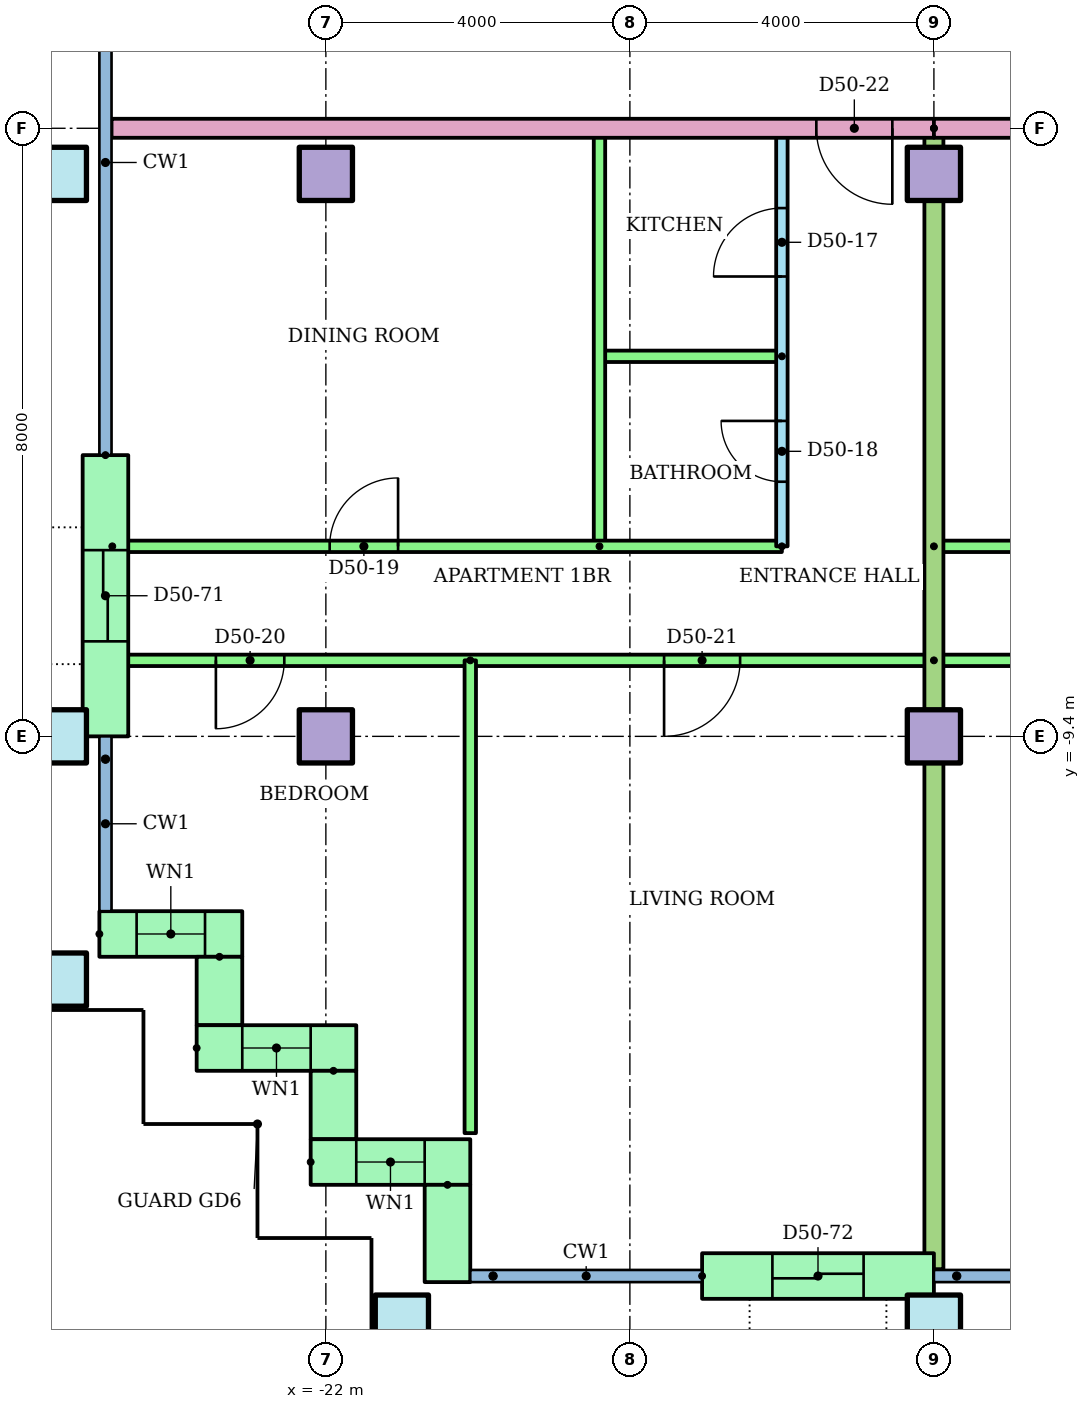
"""IFC4 building model, lengths in metres.
Left out: names, types, materials, properties, quantities, classifications, styles, units other than length and angle.
Written with IfcOpenShell. Run it as: python <this file> out.ifc"""

import sys

from ifc_helpers import new_model, si_unit, direction, frame, frame_2d, origin, origin_2d, place, context, subcontext, project, spatial, rectangle, hollow_rectangle, extrude, element, fill, save


model = new_model("IFC4")
c1 = context("Model", 3, precision=1e-05, world=origin(), true_north=direction((0.0, 1.0)))
c2 = subcontext(c1, "Body", "Model", "MODEL_VIEW")
j1 = project(units=[si_unit("LENGTHUNIT", "METRE"), si_unit("PLANEANGLEUNIT", "RADIAN")], contexts=[c1])
p1 = place(None, origin())
s1 = spatial("IfcSite", under=j1, at=p1, CompositionType="ELEMENT")
p2 = place(p1, origin())
s2 = spatial("IfcBuilding", under=s1, at=p2, CompositionType="ELEMENT")
p3 = place(p2, frame((0.0, 0.0, 190.9)))
s3 = spatial("IfcBuildingStorey", under=s2, at=p3, CompositionType="ELEMENT", Elevation=190.9)
for number, where in (
    (1, (-21.0, -17.1, 0.0)),
    (2, (-14.0, -17.1, 0.0)),
    (3, (-25.5, -12.6, 0.0)),
    (4, (-25.5, -9.4, 0.0)),
):
    element("IfcColumn", number, at=place(p3, frame(where)), inside=s3, PredefinedType="COLUMN", context=c2, shape_type="SweptSolid", body=[
        extrude(hollow_rectangle(XDim=0.7, YDim=0.7, WallThickness=0.036, at=origin_2d()), origin(), (0.0, 0.0, 1.0), 3.2),
    ])
for number, where in (
    (5, (-22.0, -9.4, 0.0)),
    (6, (-14.0, -9.4, 0.0)),
):
    element("IfcColumn", number, at=place(p3, frame(where)), inside=s3, PredefinedType="COLUMN", context=c2, shape_type="SweptSolid", body=[
        extrude(rectangle(XDim=0.7, YDim=0.7, at=origin_2d()), origin(), (0.0, 0.0, 1.0), 3.2),
    ])
p4 = place(p3, frame((-25.5, -2.0, 0.0)))
e7 = element("IfcColumn", 7, at=p4, inside=s3, PredefinedType="COLUMN", context=c2, shape_type="SweptSolid", body=[
    extrude(hollow_rectangle(XDim=0.7, YDim=0.7, WallThickness=0.036, at=origin_2d()), origin(), (0.0, 0.0, 1.0), 3.2),
])
for number, where in (
    (8, (-22.0, -2.0, 0.0)),
    (9, (-14.0, -2.0, 0.0)),
):
    element("IfcColumn", number, at=place(p3, frame(where)), inside=s3, PredefinedType="COLUMN", context=c2, shape_type="SweptSolid", body=[
        extrude(rectangle(XDim=0.7, YDim=0.7, at=origin_2d()), origin(), (0.0, 0.0, 1.0), 3.2),
    ])
p5 = place(p3, frame((-24.9, -5.7, 0.0), z_axis=(0.0, 0.0, 1.0), x_axis=(0.0, -1.0, 0.0)))
e10 = element("IfcWall", 10, at=p5, inside=s3, PredefinedType="STANDARD", context=c2, shape_type="SweptSolid", body=[
    extrude(rectangle(XDim=3.7, YDim=0.6, at=frame_2d((1.85, 0.0))), origin(), (0.0, 0.0, 1.0), 2.8),
])
p6 = place(p5, frame((1.25, 0.0, 0.0)))
e11 = element("IfcOpeningElement", 11, at=p6, cuts=e10, PredefinedType="OPENING", context=c2, shape_type="SweptSolid", body=[
    extrude(rectangle(XDim=1.2, YDim=2.1, at=frame_2d((0.6, 1.05))), frame((0.0, 0.31, 0.0), z_axis=(0.0, -1.0, 0.0), x_axis=(1.0, 0.0, 0.0)), (0.0, 0.0, 1.0), 0.62),
])
p7 = place(p3, frame((-24.98, -12.0, 0.0)))
e12 = element("IfcWall", 12, at=p7, inside=s3, PredefinedType="STANDARD", context=c2, shape_type="SweptSolid", body=[
    extrude(rectangle(XDim=1.88, YDim=0.6, at=frame_2d((0.94, 0.0))), origin(), (0.0, 0.0, 1.0), 2.8),
])
p8 = place(p7, frame((0.49, 0.0, 0.9)))
e13 = element("IfcOpeningElement", 13, at=p8, cuts=e12, PredefinedType="OPENING", context=c2, shape_type="SweptSolid", body=[
    extrude(rectangle(XDim=0.9, YDim=1.5, at=frame_2d((0.45, 0.75))), frame((0.0, 0.31, 0.0), z_axis=(0.0, -1.0, 0.0), x_axis=(1.0, 0.0, 0.0)), (0.0, 0.0, 1.0), 0.62),
])
p9 = place(p3, frame((-23.4, -12.3, 0.0), z_axis=(0.0, 0.0, 1.0), x_axis=(0.0, -1.0, 0.0)))
e14 = element("IfcWall", 14, at=p9, inside=s3, PredefinedType="STANDARD", context=c2, shape_type="SweptSolid", body=[
    extrude(rectangle(XDim=0.9, YDim=0.6, at=frame_2d((0.45, 0.0))), origin(), (0.0, 0.0, 1.0), 2.8),
])
p10 = place(p3, frame((-23.7, -13.5, 0.0)))
e15 = element("IfcWall", 15, at=p10, inside=s3, PredefinedType="STANDARD", context=c2, shape_type="SweptSolid", body=[
    extrude(rectangle(XDim=2.1, YDim=0.6, at=frame_2d((1.05, 0.0))), origin(), (0.0, 0.0, 1.0), 2.8),
])
p11 = place(p10, frame((0.6, 0.0, 0.9)))
e16 = element("IfcOpeningElement", 16, at=p11, cuts=e15, PredefinedType="OPENING", context=c2, shape_type="SweptSolid", body=[
    extrude(rectangle(XDim=0.9, YDim=1.5, at=frame_2d((0.45, 0.75))), frame((0.0, 0.31, 0.0), z_axis=(0.0, -1.0, 0.0), x_axis=(1.0, 0.0, 0.0)), (0.0, 0.0, 1.0), 0.62),
])
p12 = place(p3, frame((-21.9, -13.8, 0.0), z_axis=(0.0, 0.0, 1.0), x_axis=(0.0, -1.0, 0.0)))
e17 = element("IfcWall", 17, at=p12, inside=s3, PredefinedType="STANDARD", context=c2, shape_type="SweptSolid", body=[
    extrude(rectangle(XDim=0.9, YDim=0.6, at=frame_2d((0.45, 0.0))), origin(), (0.0, 0.0, 1.0), 2.8),
])
p13 = place(p3, frame((-22.2, -15.0, 0.0)))
e18 = element("IfcWall", 18, at=p13, inside=s3, PredefinedType="STANDARD", context=c2, shape_type="SweptSolid", body=[
    extrude(rectangle(XDim=2.1, YDim=0.6, at=frame_2d((1.05, 0.0))), origin(), (0.0, 0.0, 1.0), 2.8),
])
p14 = place(p13, frame((0.6, 0.0, 0.9)))
e19 = element("IfcOpeningElement", 19, at=p14, cuts=e18, PredefinedType="OPENING", context=c2, shape_type="SweptSolid", body=[
    extrude(rectangle(XDim=0.9, YDim=1.5, at=frame_2d((0.45, 0.75))), frame((0.0, 0.31, 0.0), z_axis=(0.0, -1.0, 0.0), x_axis=(1.0, 0.0, 0.0)), (0.0, 0.0, 1.0), 0.62),
])
p15 = place(p3, frame((-20.4, -15.3, 0.0), z_axis=(0.0, 0.0, 1.0), x_axis=(0.0, -1.0, 0.0)))
e20 = element("IfcWall", 20, at=p15, inside=s3, PredefinedType="STANDARD", context=c2, shape_type="SweptSolid", body=[
    extrude(rectangle(XDim=1.28, YDim=0.6, at=frame_2d((0.64, 0.0))), origin(), (0.0, 0.0, 1.0), 2.8),
])
p16 = place(p3, frame((-17.05, -16.5, 0.0)))
e21 = element("IfcWall", 21, at=p16, inside=s3, PredefinedType="STANDARD", context=c2, shape_type="SweptSolid", body=[
    extrude(rectangle(XDim=3.05, YDim=0.6, at=frame_2d((1.525, 0.0))), origin(), (0.0, 0.0, 1.0), 2.8),
])
p17 = place(p16, frame((0.925, 0.0, 0.0)))
e22 = element("IfcOpeningElement", 22, at=p17, cuts=e21, PredefinedType="OPENING", context=c2, shape_type="SweptSolid", body=[
    extrude(rectangle(XDim=1.2, YDim=2.1, at=frame_2d((0.6, 1.05))), frame((0.0, 0.31, 0.0), z_axis=(0.0, -1.0, 0.0), x_axis=(1.0, 0.0, 0.0)), (0.0, 0.0, 1.0), 0.62),
])
p18 = place(p3, frame((-16.0, -6.9, 0.0), z_axis=(0.0, 0.0, 1.0), x_axis=(0.0, 1.0, 0.0)))
e23 = element("IfcWall", 23, at=p18, inside=s3, PredefinedType="PARTITIONING", context=c2, shape_type="SweptSolid", body=[
    extrude(rectangle(XDim=5.5, YDim=0.15, at=frame_2d((2.75, 0.0))), origin(), (0.0, 0.0, 1.0), 2.4),
])
p19 = place(p18, frame((3.55, 0.0, 0.0)))
e24 = element("IfcOpeningElement", 24, at=p19, cuts=e23, PredefinedType="OPENING", context=c2, shape_type="SweptSolid", body=[
    extrude(rectangle(XDim=0.9, YDim=2.1, at=frame_2d((0.45, 1.05))), frame((0.0, 0.085, 0.0), z_axis=(0.0, -1.0, 0.0), x_axis=(1.0, 0.0, 0.0)), (0.0, 0.0, 1.0), 0.17),
])
p20 = place(p18, frame((0.85, 0.0, 0.0)))
e25 = element("IfcOpeningElement", 25, at=p20, cuts=e23, PredefinedType="OPENING", context=c2, shape_type="SweptSolid", body=[
    extrude(rectangle(XDim=0.8, YDim=2.1, at=frame_2d((0.4, 1.05))), frame((0.0, 0.085, 0.0), z_axis=(0.0, -1.0, 0.0), x_axis=(1.0, 0.0, 0.0)), (0.0, 0.0, 1.0), 0.17),
])
p21 = place(p3, frame((-16.0, -4.4, 0.0), z_axis=(0.0, 0.0, 1.0), x_axis=(-1.0, 0.0, 0.0)))
e26 = element("IfcWall", 26, at=p21, inside=s3, PredefinedType="PARTITIONING", context=c2, shape_type="SweptSolid", body=[
    extrude(rectangle(XDim=2.4, YDim=0.15, at=frame_2d((1.2, 0.0))), origin(), (0.0, 0.0, 1.0), 2.4),
])
p22 = place(p3, frame((-18.4, -6.9, 0.0), z_axis=(0.0, 0.0, 1.0), x_axis=(0.0, 1.0, 0.0)))
e27 = element("IfcWall", 27, at=p22, inside=s3, PredefinedType="PARTITIONING", context=c2, shape_type="SweptSolid", body=[
    extrude(rectangle(XDim=5.5, YDim=0.15, at=frame_2d((2.75, 0.0))), origin(), (0.0, 0.0, 1.0), 2.4),
])
p23 = place(p3, frame((-24.81, -6.9, 0.0)))
e28 = element("IfcWall", 28, at=p23, inside=s3, PredefinedType="PARTITIONING", context=c2, shape_type="SweptSolid", body=[
    extrude(rectangle(XDim=8.81, YDim=0.15, at=frame_2d((4.405, 0.0))), origin(), (0.0, 0.0, 1.0), 2.4),
])
p24 = place(p23, frame((2.86, 0.0, 0.0)))
e29 = element("IfcOpeningElement", 29, at=p24, cuts=e28, PredefinedType="OPENING", context=c2, shape_type="SweptSolid", body=[
    extrude(rectangle(XDim=0.9, YDim=2.1, at=frame_2d((0.45, 1.05))), frame((0.0, 0.085, 0.0), z_axis=(0.0, -1.0, 0.0), x_axis=(1.0, 0.0, 0.0)), (0.0, 0.0, 1.0), 0.17),
])
p25 = place(p3, frame((-14.0, -8.4, 0.0), z_axis=(0.0, 0.0, 1.0), x_axis=(-1.0, 0.0, 0.0)))
e30 = element("IfcWall", 30, at=p25, inside=s3, PredefinedType="PARTITIONING", context=c2, shape_type="SweptSolid", body=[
    extrude(rectangle(XDim=10.81, YDim=0.15, at=frame_2d((5.405, 0.0))), origin(), (0.0, 0.0, 1.0), 2.4),
])
p26 = place(p25, frame((8.547, 0.0, 0.0)))
e31 = element("IfcOpeningElement", 31, at=p26, cuts=e30, PredefinedType="OPENING", context=c2, shape_type="SweptSolid", body=[
    extrude(rectangle(XDim=0.9, YDim=2.1, at=frame_2d((0.45, 1.05))), frame((0.0, 0.085, 0.0), z_axis=(0.0, -1.0, 0.0), x_axis=(1.0, 0.0, 0.0)), (0.0, 0.0, 1.0), 0.17),
])
p27 = place(p25, frame((2.55, 0.0, 0.0)))
e32 = element("IfcOpeningElement", 32, at=p27, cuts=e30, PredefinedType="OPENING", context=c2, shape_type="SweptSolid", body=[
    extrude(rectangle(XDim=1.0, YDim=2.1, at=frame_2d((0.5, 1.05))), frame((0.0, 0.085, 0.0), z_axis=(0.0, -1.0, 0.0), x_axis=(1.0, 0.0, 0.0)), (0.0, 0.0, 1.0), 0.17),
])
p28 = place(p3, frame((-20.1, -8.4, 0.0), z_axis=(0.0, 0.0, 1.0), x_axis=(0.0, -1.0, 0.0)))
e33 = element("IfcWall", 33, at=p28, inside=s3, PredefinedType="PARTITIONING", context=c2, shape_type="SweptSolid", body=[
    extrude(rectangle(XDim=6.22, YDim=0.15, at=frame_2d((3.11, 0.0))), origin(), (0.0, 0.0, 1.0), 2.4),
])
p29 = place(p3, frame((-14.0, -6.9, 0.0)))
e34 = element("IfcWall", 34, at=p29, inside=s3, PredefinedType="PARTITIONING", context=c2, shape_type="SweptSolid", body=[
    extrude(rectangle(XDim=22.0, YDim=0.15, at=frame_2d((11.0, 0.0))), origin(), (0.0, 0.0, 1.0), 2.4),
])
p30 = place(p29, frame((15.025, 0.0, 0.0)))
e35 = element("IfcOpeningElement", 35, at=p30, cuts=e34, PredefinedType="OPENING", context=c2, shape_type="SweptSolid", body=[
    extrude(rectangle(XDim=0.9, YDim=2.1, at=frame_2d((0.45, 1.05))), frame((0.0, 0.085, 0.0), z_axis=(0.0, -1.0, 0.0), x_axis=(1.0, 0.0, 0.0)), (0.0, 0.0, 1.0), 0.17),
])
p31 = place(p29, frame((7.65, 0.0, 0.0)))
e36 = element("IfcOpeningElement", 36, at=p31, cuts=e34, PredefinedType="OPENING", context=c2, shape_type="SweptSolid", body=[
    extrude(rectangle(XDim=0.9, YDim=2.1, at=frame_2d((0.45, 1.05))), frame((0.0, 0.085, 0.0), z_axis=(0.0, -1.0, 0.0), x_axis=(1.0, 0.0, 0.0)), (0.0, 0.0, 1.0), 0.17),
])
p32 = place(p29, frame((1.975, 0.0, 0.0)))
e37 = element("IfcOpeningElement", 37, at=p32, cuts=e34, PredefinedType="OPENING", context=c2, shape_type="SweptSolid", body=[
    extrude(rectangle(XDim=0.9, YDim=2.1, at=frame_2d((0.45, 1.05))), frame((0.0, 0.085, 0.0), z_axis=(0.0, -1.0, 0.0), x_axis=(1.0, 0.0, 0.0)), (0.0, 0.0, 1.0), 0.17),
])
p33 = place(p3, frame((10.0, -8.4, 0.0), z_axis=(0.0, 0.0, 1.0), x_axis=(-1.0, 0.0, 0.0)))
e38 = element("IfcWall", 38, at=p33, inside=s3, PredefinedType="PARTITIONING", context=c2, shape_type="SweptSolid", body=[
    extrude(rectangle(XDim=24.0, YDim=0.15, at=frame_2d((12.0, 0.0))), origin(), (0.0, 0.0, 1.0), 2.4),
])
p34 = place(p33, frame((19.5, 0.0, 0.0)))
e39 = element("IfcOpeningElement", 39, at=p34, cuts=e38, PredefinedType="OPENING", context=c2, shape_type="SweptSolid", body=[
    extrude(rectangle(XDim=1.0, YDim=2.1, at=frame_2d((0.5, 1.05))), frame((0.0, 0.085, 0.0), z_axis=(0.0, -1.0, 0.0), x_axis=(1.0, 0.0, 0.0)), (0.0, 0.0, 1.0), 0.17),
])
p35 = place(p33, frame((13.55, 0.0, 0.0)))
e40 = element("IfcOpeningElement", 40, at=p35, cuts=e38, PredefinedType="OPENING", context=c2, shape_type="SweptSolid", body=[
    extrude(rectangle(XDim=0.9, YDim=2.1, at=frame_2d((0.45, 1.05))), frame((0.0, 0.085, 0.0), z_axis=(0.0, -1.0, 0.0), x_axis=(1.0, 0.0, 0.0)), (0.0, 0.0, 1.0), 0.17),
])
p36 = place(p33, frame((9.55, 0.0, 0.0)))
e41 = element("IfcOpeningElement", 41, at=p36, cuts=e38, PredefinedType="OPENING", context=c2, shape_type="SweptSolid", body=[
    extrude(rectangle(XDim=0.9, YDim=2.1, at=frame_2d((0.45, 1.05))), frame((0.0, 0.085, 0.0), z_axis=(0.0, -1.0, 0.0), x_axis=(1.0, 0.0, 0.0)), (0.0, 0.0, 1.0), 0.17),
])
p37 = place(p33, frame((5.55, 0.0, 0.0)))
e42 = element("IfcOpeningElement", 42, at=p37, cuts=e38, PredefinedType="OPENING", context=c2, shape_type="SweptSolid", body=[
    extrude(rectangle(XDim=0.9, YDim=2.1, at=frame_2d((0.45, 1.05))), frame((0.0, 0.085, 0.0), z_axis=(0.0, -1.0, 0.0), x_axis=(1.0, 0.0, 0.0)), (0.0, 0.0, 1.0), 0.17),
])
p38 = place(p33, frame((1.55, 0.0, 0.0)))
e43 = element("IfcOpeningElement", 43, at=p38, cuts=e38, PredefinedType="OPENING", context=c2, shape_type="SweptSolid", body=[
    extrude(rectangle(XDim=0.9, YDim=2.1, at=frame_2d((0.45, 1.05))), frame((0.0, 0.085, 0.0), z_axis=(0.0, -1.0, 0.0), x_axis=(1.0, 0.0, 0.0)), (0.0, 0.0, 1.0), 0.17),
])
p39 = place(p3, frame((-14.0, -1.4, 0.0), z_axis=(0.0, 0.0, 1.0), x_axis=(0.0, -1.0, 0.0)))
e44 = element("IfcWall", 44, at=p39, inside=s3, PredefinedType="PARTITIONING", context=c2, shape_type="SweptSolid", body=[
    extrude(rectangle(XDim=15.01, YDim=0.25, at=frame_2d((7.505, 0.0))), origin(), (0.0, 0.0, 1.0), 2.4),
])
p40 = place(p3, frame((-14.0, -1.4, 0.0), z_axis=(0.0, 0.0, 1.0), x_axis=(-1.0, 0.0, 0.0)))
e45 = element("IfcWall", 45, at=p40, inside=s3, PredefinedType="PARTITIONING", context=c2, shape_type="SweptSolid", body=[
    extrude(rectangle(XDim=10.82, YDim=0.25, at=frame_2d((5.41, 0.0))), origin(), (0.0, 0.0, 1.0), 2.4),
])
p41 = place(p40, frame((0.547, 0.0, 0.0)))
e46 = element("IfcOpeningElement", 46, at=p41, cuts=e45, PredefinedType="OPENING", context=c2, shape_type="SweptSolid", body=[
    extrude(rectangle(XDim=1.0, YDim=2.1, at=frame_2d((0.5, 1.05))), frame((0.0, 0.135, 0.0), z_axis=(0.0, -1.0, 0.0), x_axis=(1.0, 0.0, 0.0)), (0.0, 0.0, 1.0), 0.27),
])
p42 = place(p3, frame((14.0, -1.4, 0.0), z_axis=(0.0, 0.0, 1.0), x_axis=(-1.0, 0.0, 0.0)))
e47 = element("IfcWall", 47, at=p42, inside=s3, PredefinedType="PARTITIONING", context=c2, shape_type="SweptSolid", body=[
    extrude(rectangle(XDim=28.0, YDim=0.25, at=frame_2d((14.0, 0.0))), origin(), (0.0, 0.0, 1.0), 2.4),
])
p43 = place(p42, frame((4.547, 0.0, 0.0)))
e48 = element("IfcOpeningElement", 48, at=p43, cuts=e47, PredefinedType="OPENING", context=c2, shape_type="SweptSolid", body=[
    extrude(rectangle(XDim=1.0, YDim=2.1, at=frame_2d((0.5, 1.05))), frame((0.0, 0.135, 0.0), z_axis=(0.0, -1.0, 0.0), x_axis=(1.0, 0.0, 0.0)), (0.0, 0.0, 1.0), 0.27),
])
p44 = place(p42, frame((2.453, 0.0, 0.0)))
e49 = element("IfcOpeningElement", 49, at=p44, cuts=e47, PredefinedType="OPENING", context=c2, shape_type="SweptSolid", body=[
    extrude(rectangle(XDim=1.0, YDim=2.1, at=frame_2d((0.5, 1.05))), frame((0.0, 0.135, 0.0), z_axis=(0.0, -1.0, 0.0), x_axis=(1.0, 0.0, 0.0)), (0.0, 0.0, 1.0), 0.27),
])
p45 = place(p8, origin())
e50 = element("IfcWindow", 50, at=p45, inside=s3, PartitioningType="SINGLE_PANEL", PredefinedType="WINDOW", context=c2, shape_type="SweptSolid", body=[
    extrude(rectangle(XDim=0.9, YDim=1.5, at=frame_2d((0.45, 0.75))), frame((0.0, 0.03, 0.0), z_axis=(0.0, -1.0, 0.0), x_axis=(1.0, 0.0, 0.0)), (0.0, 0.0, 1.0), 0.06),
])
fill(e13, e50)
p46 = place(p11, origin())
e51 = element("IfcWindow", 51, at=p46, inside=s3, PartitioningType="SINGLE_PANEL", PredefinedType="WINDOW", context=c2, shape_type="SweptSolid", body=[
    extrude(rectangle(XDim=0.9, YDim=1.5, at=frame_2d((0.45, 0.75))), frame((0.0, 0.03, 0.0), z_axis=(0.0, -1.0, 0.0), x_axis=(1.0, 0.0, 0.0)), (0.0, 0.0, 1.0), 0.06),
])
fill(e16, e51)
p47 = place(p14, origin())
e52 = element("IfcWindow", 52, at=p47, inside=s3, PartitioningType="SINGLE_PANEL", PredefinedType="WINDOW", context=c2, shape_type="SweptSolid", body=[
    extrude(rectangle(XDim=0.9, YDim=1.5, at=frame_2d((0.45, 0.75))), frame((0.0, 0.03, 0.0), z_axis=(0.0, -1.0, 0.0), x_axis=(1.0, 0.0, 0.0)), (0.0, 0.0, 1.0), 0.06),
])
fill(e19, e52)
p48 = place(p19, origin())
e53 = element("IfcDoor", 53, at=p48, inside=s3, OperationType="SINGLE_SWING_LEFT", PredefinedType="DOOR", context=c2, shape_type="SweptSolid", body=[
    extrude(rectangle(XDim=0.9, YDim=2.1, at=frame_2d((0.45, 1.05))), frame((0.0, 0.025, 0.0), z_axis=(0.0, -1.0, 0.0), x_axis=(1.0, 0.0, 0.0)), (0.0, 0.0, 1.0), 0.05),
])
fill(e24, e53)
p49 = place(p20, origin())
e54 = element("IfcDoor", 54, at=p49, inside=s3, OperationType="SINGLE_SWING_RIGHT", PredefinedType="DOOR", context=c2, shape_type="SweptSolid", body=[
    extrude(rectangle(XDim=0.8, YDim=2.1, at=frame_2d((0.4, 1.05))), frame((0.0, 0.025, 0.0), z_axis=(0.0, -1.0, 0.0), x_axis=(1.0, 0.0, 0.0)), (0.0, 0.0, 1.0), 0.05),
])
fill(e25, e54)
p50 = place(p24, origin())
e55 = element("IfcDoor", 55, at=p50, inside=s3, OperationType="SINGLE_SWING_RIGHT", PredefinedType="DOOR", context=c2, shape_type="SweptSolid", body=[
    extrude(rectangle(XDim=0.9, YDim=2.1, at=frame_2d((0.45, 1.05))), frame((0.0, 0.025, 0.0), z_axis=(0.0, -1.0, 0.0), x_axis=(1.0, 0.0, 0.0)), (0.0, 0.0, 1.0), 0.05),
])
fill(e29, e55)
p51 = place(p26, origin())
e56 = element("IfcDoor", 56, at=p51, inside=s3, OperationType="SINGLE_SWING_RIGHT", PredefinedType="DOOR", context=c2, shape_type="SweptSolid", body=[
    extrude(rectangle(XDim=0.9, YDim=2.1, at=frame_2d((0.45, 1.05))), frame((0.0, 0.025, 0.0), z_axis=(0.0, -1.0, 0.0), x_axis=(1.0, 0.0, 0.0)), (0.0, 0.0, 1.0), 0.05),
])
fill(e31, e56)
p52 = place(p27, origin())
e57 = element("IfcDoor", 57, at=p52, inside=s3, OperationType="SINGLE_SWING_RIGHT", PredefinedType="DOOR", context=c2, shape_type="SweptSolid", body=[
    extrude(rectangle(XDim=1.0, YDim=2.1, at=frame_2d((0.5, 1.05))), frame((0.0, 0.025, 0.0), z_axis=(0.0, -1.0, 0.0), x_axis=(1.0, 0.0, 0.0)), (0.0, 0.0, 1.0), 0.05),
])
fill(e32, e57)
p53 = place(p41, origin())
e58 = element("IfcDoor", 58, at=p53, inside=s3, OperationType="SINGLE_SWING_LEFT", PredefinedType="DOOR", context=c2, shape_type="SweptSolid", body=[
    extrude(rectangle(XDim=1.0, YDim=2.1, at=frame_2d((0.5, 1.05))), frame((0.0, 0.025, 0.0), z_axis=(0.0, -1.0, 0.0), x_axis=(1.0, 0.0, 0.0)), (0.0, 0.0, 1.0), 0.05),
])
fill(e46, e58)
p54 = place(p6, origin())
e59 = element("IfcDoor", 59, at=p54, inside=s3, OperationType="SLIDING_TO_LEFT", PredefinedType="DOOR", context=c2, shape_type="SweptSolid", body=[
    extrude(rectangle(XDim=1.2, YDim=2.1, at=frame_2d((0.6, 1.05))), frame((0.0, 0.025, 0.0), z_axis=(0.0, -1.0, 0.0), x_axis=(1.0, 0.0, 0.0)), (0.0, 0.0, 1.0), 0.05),
])
fill(e11, e59)
p55 = place(p17, origin())
e60 = element("IfcDoor", 60, at=p55, inside=s3, OperationType="SLIDING_TO_LEFT", PredefinedType="DOOR", context=c2, shape_type="SweptSolid", body=[
    extrude(rectangle(XDim=1.2, YDim=2.1, at=frame_2d((0.6, 1.05))), frame((0.0, 0.025, 0.0), z_axis=(0.0, -1.0, 0.0), x_axis=(1.0, 0.0, 0.0)), (0.0, 0.0, 1.0), 0.05),
])
fill(e22, e60)
save(model, sys.argv[1])
